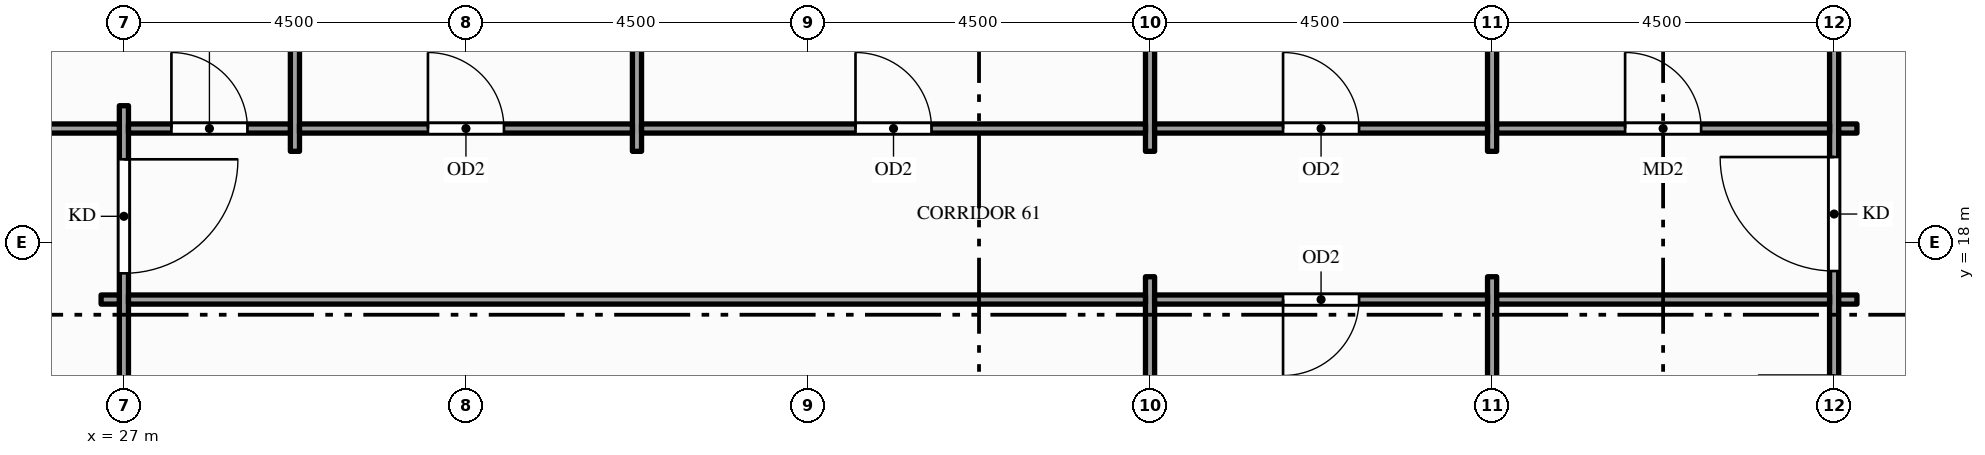
"""IFC4 building model, lengths in metres.
Left out: names, types, materials, properties, quantities, classifications, styles, units other than length and angle.
Written with IfcOpenShell. Run it as: python <this file> out.ifc"""

import sys

from ifc_helpers import new_model, si_unit, direction, frame, frame_2d, origin, place, context, subcontext, project, spatial, rectangle, extrude, element, fill, save


model = new_model("IFC4")
c1 = context("Model", 3, precision=1e-05, world=origin(), true_north=direction((0.0, 1.0)))
c2 = subcontext(c1, "Body", "Model", "MODEL_VIEW")
j1 = project(units=[si_unit("LENGTHUNIT", "METRE"), si_unit("PLANEANGLEUNIT", "RADIAN")], contexts=[c1])
p1 = place(None, origin())
s1 = spatial("IfcSite", under=j1, at=p1, CompositionType="ELEMENT")
p2 = place(p1, origin())
s2 = spatial("IfcBuilding", under=s1, at=p2, CompositionType="ELEMENT")
p3 = place(p2, frame((0.0, 0.0, 159.0)))
s3 = spatial("IfcBuildingStorey", under=s2, at=p3, CompositionType="ELEMENT", Elevation=159.0)
p4 = place(p3, frame((27.0, 5.7, 0.0), z_axis=(0.0, 0.0, 1.0), x_axis=(0.0, 1.0, 0.0)))
e1 = element("IfcWall", 1, at=p4, inside=s3, PredefinedType="PARTITIONING", context=c2, shape_type="SweptSolid", body=[
    extrude(rectangle(XDim=14.1, YDim=0.12, at=frame_2d((7.05, 0.0))), origin(), (0.0, 0.0, 1.0), 2.87),
])
p5 = place(p4, frame((0.705, 0.0, 0.0)))
e2 = element("IfcOpeningElement", 2, at=p5, cuts=e1, PredefinedType="OPENING", context=c2, shape_type="SweptSolid", body=[
    extrude(rectangle(XDim=1.5, YDim=2.1, at=frame_2d((0.75, 1.05))), frame((0.0, 0.07, 0.0), z_axis=(0.0, -1.0, 0.0), x_axis=(1.0, 0.0, 0.0)), (0.0, 0.0, 1.0), 0.14),
])
p6 = place(p4, frame((11.895, 0.0, 0.0)))
e3 = element("IfcOpeningElement", 3, at=p6, cuts=e1, PredefinedType="OPENING", context=c2, shape_type="SweptSolid", body=[
    extrude(rectangle(XDim=1.5, YDim=2.1, at=frame_2d((0.75, 1.05))), frame((0.0, 0.07, 0.0), z_axis=(0.0, -1.0, 0.0), x_axis=(1.0, 0.0, 0.0)), (0.0, 0.0, 1.0), 0.14),
])
for number, where, z_axis, x_axis in (
    (4, (29.25, 19.2, 0.0), (0.0, 0.0, 1.0), (0.0, 1.0, 0.0)),
    (5, (33.75, 19.2, 0.0), (0.0, 0.0, 1.0), (0.0, 1.0, 0.0)),
):
    element("IfcWall", number, at=place(p3, frame(where, z_axis=z_axis, x_axis=x_axis)), inside=s3, PredefinedType="PARTITIONING", context=c2, shape_type="SweptSolid", body=[
        extrude(rectangle(XDim=4.65, YDim=0.12, at=frame_2d((2.325, 0.0))), origin(), (0.0, 0.0, 1.0), 2.87),
    ])
p7 = place(p3, frame((40.5, 7.95, 0.0), z_axis=(0.0, 0.0, 1.0), x_axis=(0.0, 1.0, 0.0)))
e6 = element("IfcWall", 6, at=p7, inside=s3, PredefinedType="PARTITIONING", context=c2, shape_type="SweptSolid", body=[
    extrude(rectangle(XDim=9.6, YDim=0.12, at=frame_2d((4.8, 0.0))), origin(), (0.0, 0.0, 1.0), 2.87),
])
p8 = place(p3, frame((40.5, 19.2, 0.0), z_axis=(0.0, 0.0, 1.0), x_axis=(0.0, 1.0, 0.0)))
e7 = element("IfcWall", 7, at=p8, inside=s3, PredefinedType="PARTITIONING", context=c2, shape_type="SweptSolid", body=[
    extrude(rectangle(XDim=4.65, YDim=0.12, at=frame_2d((2.325, 0.0))), origin(), (0.0, 0.0, 1.0), 2.87),
])
p9 = place(p3, frame((45.0, 7.95, 0.0), z_axis=(0.0, 0.0, 1.0), x_axis=(0.0, 1.0, 0.0)))
e8 = element("IfcWall", 8, at=p9, inside=s3, PredefinedType="PARTITIONING", context=c2, shape_type="SweptSolid", body=[
    extrude(rectangle(XDim=9.6, YDim=0.12, at=frame_2d((4.8, 0.0))), origin(), (0.0, 0.0, 1.0), 2.87),
])
p10 = place(p3, frame((45.0, 19.2, 0.0), z_axis=(0.0, 0.0, 1.0), x_axis=(0.0, 1.0, 0.0)))
e9 = element("IfcWall", 9, at=p10, inside=s3, PredefinedType="PARTITIONING", context=c2, shape_type="SweptSolid", body=[
    extrude(rectangle(XDim=4.65, YDim=0.12, at=frame_2d((2.325, 0.0))), origin(), (0.0, 0.0, 1.0), 2.87),
])
p11 = place(p3, frame((49.5, 1.65, 0.0), z_axis=(0.0, 0.0, 1.0), x_axis=(0.0, 1.0, 0.0)))
e10 = element("IfcWall", 10, at=p11, inside=s3, PredefinedType="PARTITIONING", context=c2, shape_type="SweptSolid", body=[
    extrude(rectangle(XDim=22.2, YDim=0.12, at=frame_2d((11.1, 0.0))), origin(), (0.0, 0.0, 1.0), 2.87),
])
p12 = place(p11, frame((4.725, 0.0, 0.0)))
e11 = element("IfcOpeningElement", 11, at=p12, cuts=e10, PredefinedType="OPENING", context=c2, shape_type="SweptSolid", body=[
    extrude(rectangle(XDim=1.5, YDim=2.1, at=frame_2d((0.75, 1.05))), frame((0.0, 0.07, 0.0), z_axis=(0.0, -1.0, 0.0), x_axis=(1.0, 0.0, 0.0)), (0.0, 0.0, 1.0), 0.14),
])
p13 = place(p11, frame((15.975, 0.0, 0.0)))
e12 = element("IfcOpeningElement", 12, at=p13, cuts=e10, PredefinedType="OPENING", context=c2, shape_type="SweptSolid", body=[
    extrude(rectangle(XDim=1.5, YDim=2.1, at=frame_2d((0.75, 1.05))), frame((0.0, 0.07, 0.0), z_axis=(0.0, -1.0, 0.0), x_axis=(1.0, 0.0, 0.0)), (0.0, 0.0, 1.0), 0.14),
])
p14 = place(p11, frame((7.6, 0.0, 0.0)))
e13 = element("IfcOpeningElement", 13, at=p14, cuts=e10, PredefinedType="OPENING", context=c2, shape_type="SweptSolid", body=[
    extrude(rectangle(XDim=0.9, YDim=2.1, at=frame_2d((0.45, 1.05))), frame((0.0, 0.07, 0.0), z_axis=(0.0, -1.0, 0.0), x_axis=(1.0, 0.0, 0.0)), (0.0, 0.0, 1.0), 0.14),
])
p15 = place(p11, frame((10.65, 0.0, 0.0)))
e14 = element("IfcOpeningElement", 14, at=p15, cuts=e10, PredefinedType="OPENING", context=c2, shape_type="SweptSolid", body=[
    extrude(rectangle(XDim=0.9, YDim=2.1, at=frame_2d((0.45, 1.05))), frame((0.0, 0.07, 0.0), z_axis=(0.0, -1.0, 0.0), x_axis=(1.0, 0.0, 0.0)), (0.0, 0.0, 1.0), 0.14),
])
p16 = place(p11, frame((13.6, 0.0, 0.0)))
e15 = element("IfcOpeningElement", 15, at=p16, cuts=e10, PredefinedType="OPENING", context=c2, shape_type="SweptSolid", body=[
    extrude(rectangle(XDim=1.0, YDim=2.1, at=frame_2d((0.5, 1.05))), frame((0.0, 0.07, 0.0), z_axis=(0.0, -1.0, 0.0), x_axis=(1.0, 0.0, 0.0)), (0.0, 0.0, 1.0), 0.14),
])
p17 = place(p3, frame((26.7, 17.25, 0.0), z_axis=(0.0, 0.0, 1.0), x_axis=(1.0, 0.0, 0.0)))
e16 = element("IfcWall", 16, at=p17, inside=s3, PredefinedType="PARTITIONING", context=c2, shape_type="SweptSolid", body=[
    extrude(rectangle(XDim=0.24, YDim=0.12, at=frame_2d((0.12, 0.0))), origin(), (0.0, 0.0, 1.0), 2.87),
])
p18 = place(p3, frame((27.06, 17.25, 0.0), z_axis=(0.0, 0.0, 1.0), x_axis=(1.0, 0.0, 0.0)))
e17 = element("IfcWall", 17, at=p18, inside=s3, PredefinedType="PARTITIONING", context=c2, shape_type="SweptSolid", body=[
    extrude(rectangle(XDim=13.38, YDim=0.12, at=frame_2d((6.69, 0.0))), origin(), (0.0, 0.0, 1.0), 2.87),
])
p19 = place(p3, frame((40.56, 17.25, 0.0), z_axis=(0.0, 0.0, 1.0), x_axis=(1.0, 0.0, 0.0)))
e18 = element("IfcWall", 18, at=p19, inside=s3, PredefinedType="PARTITIONING", context=c2, shape_type="SweptSolid", body=[
    extrude(rectangle(XDim=4.38, YDim=0.12, at=frame_2d((2.19, 0.0))), origin(), (0.0, 0.0, 1.0), 2.87),
])
p20 = place(p19, frame((1.69, 0.0, 0.0)))
e19 = element("IfcOpeningElement", 19, at=p20, cuts=e18, PredefinedType="OPENING", context=c2, shape_type="SweptSolid", body=[
    extrude(rectangle(XDim=1.0, YDim=2.1, at=frame_2d((0.5, 1.05))), frame((0.0, 0.07, 0.0), z_axis=(0.0, -1.0, 0.0), x_axis=(1.0, 0.0, 0.0)), (0.0, 0.0, 1.0), 0.14),
])
p21 = place(p3, frame((45.06, 17.25, 0.0), z_axis=(0.0, 0.0, 1.0), x_axis=(1.0, 0.0, 0.0)))
e20 = element("IfcWall", 20, at=p21, inside=s3, PredefinedType="PARTITIONING", context=c2, shape_type="SweptSolid", body=[
    extrude(rectangle(XDim=4.38, YDim=0.12, at=frame_2d((2.19, 0.0))), origin(), (0.0, 0.0, 1.0), 2.87),
])
p22 = place(p3, frame((49.56, 17.25, 0.0), z_axis=(0.0, 0.0, 1.0), x_axis=(1.0, 0.0, 0.0)))
e21 = element("IfcWall", 21, at=p22, inside=s3, PredefinedType="PARTITIONING", context=c2, shape_type="SweptSolid", body=[
    extrude(rectangle(XDim=0.24, YDim=0.12, at=frame_2d((0.12, 0.0))), origin(), (0.0, 0.0, 1.0), 2.87),
])
p23 = place(p3, frame((24.81, 19.5, 0.0), z_axis=(0.0, 0.0, 1.0), x_axis=(1.0, 0.0, 0.0)))
e22 = element("IfcWall", 22, at=p23, inside=s3, PredefinedType="PARTITIONING", context=c2, shape_type="SweptSolid", body=[
    extrude(rectangle(XDim=2.13, YDim=0.12, at=frame_2d((1.065, 0.0))), origin(), (0.0, 0.0, 1.0), 2.87),
])
p24 = place(p3, frame((27.06, 19.5, 0.0), z_axis=(0.0, 0.0, 1.0), x_axis=(1.0, 0.0, 0.0)))
e23 = element("IfcWall", 23, at=p24, inside=s3, PredefinedType="PARTITIONING", context=c2, shape_type="SweptSolid", body=[
    extrude(rectangle(XDim=2.13, YDim=0.12, at=frame_2d((1.065, 0.0))), origin(), (0.0, 0.0, 1.0), 2.87),
])
p25 = place(p24, frame((0.565, 0.0, 0.0)))
e24 = element("IfcOpeningElement", 24, at=p25, cuts=e23, PredefinedType="OPENING", context=c2, shape_type="SweptSolid", body=[
    extrude(rectangle(XDim=1.0, YDim=2.1, at=frame_2d((0.5, 1.05))), frame((0.0, 0.07, 0.0), z_axis=(0.0, -1.0, 0.0), x_axis=(1.0, 0.0, 0.0)), (0.0, 0.0, 1.0), 0.14),
])
p26 = place(p3, frame((29.31, 19.5, 0.0), z_axis=(0.0, 0.0, 1.0), x_axis=(1.0, 0.0, 0.0)))
e25 = element("IfcWall", 25, at=p26, inside=s3, PredefinedType="PARTITIONING", context=c2, shape_type="SweptSolid", body=[
    extrude(rectangle(XDim=4.38, YDim=0.12, at=frame_2d((2.19, 0.0))), origin(), (0.0, 0.0, 1.0), 2.87),
])
p27 = place(p26, frame((1.69, 0.0, 0.0)))
e26 = element("IfcOpeningElement", 26, at=p27, cuts=e25, PredefinedType="OPENING", context=c2, shape_type="SweptSolid", body=[
    extrude(rectangle(XDim=1.0, YDim=2.1, at=frame_2d((0.5, 1.05))), frame((0.0, 0.07, 0.0), z_axis=(0.0, -1.0, 0.0), x_axis=(1.0, 0.0, 0.0)), (0.0, 0.0, 1.0), 0.14),
])
p28 = place(p3, frame((33.81, 19.5, 0.0), z_axis=(0.0, 0.0, 1.0), x_axis=(1.0, 0.0, 0.0)))
e27 = element("IfcWall", 27, at=p28, inside=s3, PredefinedType="PARTITIONING", context=c2, shape_type="SweptSolid", body=[
    extrude(rectangle(XDim=6.63, YDim=0.12, at=frame_2d((3.315, 0.0))), origin(), (0.0, 0.0, 1.0), 2.87),
])
p29 = place(p28, frame((2.815, 0.0, 0.0)))
e28 = element("IfcOpeningElement", 28, at=p29, cuts=e27, PredefinedType="OPENING", context=c2, shape_type="SweptSolid", body=[
    extrude(rectangle(XDim=1.0, YDim=2.1, at=frame_2d((0.5, 1.05))), frame((0.0, 0.07, 0.0), z_axis=(0.0, -1.0, 0.0), x_axis=(1.0, 0.0, 0.0)), (0.0, 0.0, 1.0), 0.14),
])
p30 = place(p3, frame((40.56, 19.5, 0.0), z_axis=(0.0, 0.0, 1.0), x_axis=(1.0, 0.0, 0.0)))
e29 = element("IfcWall", 29, at=p30, inside=s3, PredefinedType="PARTITIONING", context=c2, shape_type="SweptSolid", body=[
    extrude(rectangle(XDim=4.38, YDim=0.12, at=frame_2d((2.19, 0.0))), origin(), (0.0, 0.0, 1.0), 2.87),
])
p31 = place(p30, frame((1.69, 0.0, 0.0)))
e30 = element("IfcOpeningElement", 30, at=p31, cuts=e29, PredefinedType="OPENING", context=c2, shape_type="SweptSolid", body=[
    extrude(rectangle(XDim=1.0, YDim=2.1, at=frame_2d((0.5, 1.05))), frame((0.0, 0.07, 0.0), z_axis=(0.0, -1.0, 0.0), x_axis=(1.0, 0.0, 0.0)), (0.0, 0.0, 1.0), 0.14),
])
p32 = place(p3, frame((45.06, 19.5, 0.0), z_axis=(0.0, 0.0, 1.0), x_axis=(1.0, 0.0, 0.0)))
e31 = element("IfcWall", 31, at=p32, inside=s3, PredefinedType="PARTITIONING", context=c2, shape_type="SweptSolid", body=[
    extrude(rectangle(XDim=4.38, YDim=0.12, at=frame_2d((2.19, 0.0))), origin(), (0.0, 0.0, 1.0), 2.87),
])
p33 = place(p32, frame((1.69, 0.0, 0.0)))
e32 = element("IfcOpeningElement", 32, at=p33, cuts=e31, PredefinedType="OPENING", context=c2, shape_type="SweptSolid", body=[
    extrude(rectangle(XDim=1.0, YDim=2.1, at=frame_2d((0.5, 1.05))), frame((0.0, 0.07, 0.0), z_axis=(0.0, -1.0, 0.0), x_axis=(1.0, 0.0, 0.0)), (0.0, 0.0, 1.0), 0.14),
])
p34 = place(p3, frame((49.56, 19.5, 0.0), z_axis=(0.0, 0.0, 1.0), x_axis=(1.0, 0.0, 0.0)))
e33 = element("IfcWall", 33, at=p34, inside=s3, PredefinedType="PARTITIONING", context=c2, shape_type="SweptSolid", body=[
    extrude(rectangle(XDim=0.24, YDim=0.12, at=frame_2d((0.12, 0.0))), origin(), (0.0, 0.0, 1.0), 2.87),
])
p35 = place(p6, origin())
e34 = element("IfcDoor", 34, at=p35, inside=s3, OperationType="SINGLE_SWING_RIGHT", PredefinedType="DOOR", context=c2, shape_type="SweptSolid", body=[
    extrude(rectangle(XDim=1.5, YDim=2.1, at=frame_2d((0.75, 1.05))), frame((0.0, 0.025, 0.0), z_axis=(0.0, -1.0, 0.0), x_axis=(1.0, 0.0, 0.0)), (0.0, 0.0, 1.0), 0.05),
])
fill(e3, e34)
p36 = place(p13, origin())
e35 = element("IfcDoor", 35, at=p36, inside=s3, OperationType="SINGLE_SWING_RIGHT", PredefinedType="DOOR", context=c2, shape_type="SweptSolid", body=[
    extrude(rectangle(XDim=1.5, YDim=2.1, at=frame_2d((0.75, 1.05))), frame((0.0, 0.025, 0.0), z_axis=(0.0, -1.0, 0.0), x_axis=(1.0, 0.0, 0.0)), (0.0, 0.0, 1.0), 0.05),
])
fill(e12, e35)
p37 = place(p20, origin())
e36 = element("IfcDoor", 36, at=p37, inside=s3, OperationType="SINGLE_SWING_LEFT", PredefinedType="DOOR", context=c2, shape_type="SweptSolid", body=[
    extrude(rectangle(XDim=1.0, YDim=2.1, at=frame_2d((0.5, 1.05))), frame((0.0, 0.025, 0.0), z_axis=(0.0, -1.0, 0.0), x_axis=(1.0, 0.0, 0.0)), (0.0, 0.0, 1.0), 0.05),
])
fill(e19, e36)
p38 = place(p25, origin())
e37 = element("IfcDoor", 37, at=p38, inside=s3, OperationType="SINGLE_SWING_LEFT", PredefinedType="DOOR", context=c2, shape_type="SweptSolid", body=[
    extrude(rectangle(XDim=1.0, YDim=2.1, at=frame_2d((0.5, 1.05))), frame((0.0, 0.025, 0.0), z_axis=(0.0, -1.0, 0.0), x_axis=(1.0, 0.0, 0.0)), (0.0, 0.0, 1.0), 0.05),
])
fill(e24, e37)
p39 = place(p27, origin())
e38 = element("IfcDoor", 38, at=p39, inside=s3, OperationType="SINGLE_SWING_LEFT", PredefinedType="DOOR", context=c2, shape_type="SweptSolid", body=[
    extrude(rectangle(XDim=1.0, YDim=2.1, at=frame_2d((0.5, 1.05))), frame((0.0, 0.025, 0.0), z_axis=(0.0, -1.0, 0.0), x_axis=(1.0, 0.0, 0.0)), (0.0, 0.0, 1.0), 0.05),
])
fill(e26, e38)
p40 = place(p29, origin())
e39 = element("IfcDoor", 39, at=p40, inside=s3, OperationType="SINGLE_SWING_LEFT", PredefinedType="DOOR", context=c2, shape_type="SweptSolid", body=[
    extrude(rectangle(XDim=1.0, YDim=2.1, at=frame_2d((0.5, 1.05))), frame((0.0, 0.025, 0.0), z_axis=(0.0, -1.0, 0.0), x_axis=(1.0, 0.0, 0.0)), (0.0, 0.0, 1.0), 0.05),
])
fill(e28, e39)
p41 = place(p31, origin())
e40 = element("IfcDoor", 40, at=p41, inside=s3, OperationType="SINGLE_SWING_LEFT", PredefinedType="DOOR", context=c2, shape_type="SweptSolid", body=[
    extrude(rectangle(XDim=1.0, YDim=2.1, at=frame_2d((0.5, 1.05))), frame((0.0, 0.025, 0.0), z_axis=(0.0, -1.0, 0.0), x_axis=(1.0, 0.0, 0.0)), (0.0, 0.0, 1.0), 0.05),
])
fill(e30, e40)
p42 = place(p33, origin())
e41 = element("IfcDoor", 41, at=p42, inside=s3, OperationType="SINGLE_SWING_LEFT", PredefinedType="DOOR", context=c2, shape_type="SweptSolid", body=[
    extrude(rectangle(XDim=1.0, YDim=2.1, at=frame_2d((0.5, 1.05))), frame((0.0, 0.025, 0.0), z_axis=(0.0, -1.0, 0.0), x_axis=(1.0, 0.0, 0.0)), (0.0, 0.0, 1.0), 0.05),
])
fill(e32, e41)
save(model, sys.argv[1])
